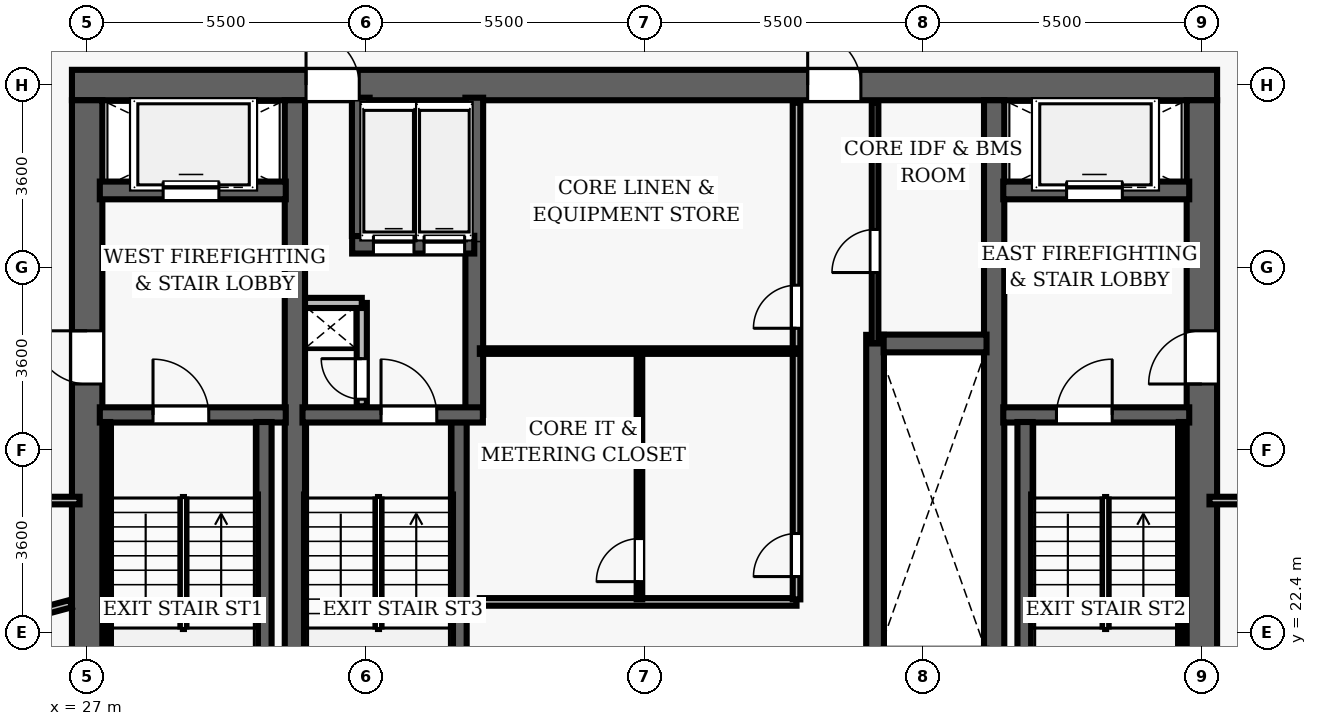
"""IFC4 building model, lengths in metres.
Left out: names, types, materials, properties, quantities, classifications, styles, units other than length and angle.
Written with IfcOpenShell. Run it as: python <this file> out.ifc"""

import sys

from ifc_helpers import new_model, si_unit, direction, frame, frame_2d, origin, place, context, subcontext, project, spatial, rectangle, extrude, element, fill, save


model = new_model("IFC4")
c1 = context("Model", 3, precision=1e-05, world=origin(), true_north=direction((0.0, 1.0)))
c2 = subcontext(c1, "Body", "Model", "MODEL_VIEW")
j1 = project(units=[si_unit("LENGTHUNIT", "METRE"), si_unit("PLANEANGLEUNIT", "RADIAN")], contexts=[c1])
p1 = place(None, origin())
s1 = spatial("IfcSite", under=j1, at=p1, CompositionType="ELEMENT")
p2 = place(p1, origin())
s2 = spatial("IfcBuilding", under=s1, at=p2, CompositionType="ELEMENT")
p3 = place(p2, frame((0.0, 0.0, 127.3)))
s3 = spatial("IfcBuildingStorey", under=s2, at=p3, CompositionType="ELEMENT", Elevation=127.3)
p4 = place(p3, frame((26.7, 33.2, 0.0), z_axis=(0.0, 0.0, 1.0), x_axis=(1.0, 0.0, 0.0)))
e1 = element("IfcWall", 1, at=p4, inside=s3, PredefinedType="SHEAR", context=c2, shape_type="SweptSolid", body=[
    extrude(rectangle(XDim=22.6, YDim=0.6, at=frame_2d((11.3, 0.0))), origin(), (0.0, 0.0, 1.0), 3.5),
])
p5 = place(p4, frame((4.62, 0.0, 0.0)))
e2 = element("IfcOpeningElement", 2, at=p5, cuts=e1, PredefinedType="OPENING", context=c2, shape_type="SweptSolid", body=[
    extrude(rectangle(XDim=1.05, YDim=2.15, at=frame_2d((0.525, 1.075))), frame((0.0, 0.31, 0.0), z_axis=(0.0, -1.0, 0.0), x_axis=(1.0, 0.0, 0.0)), (0.0, 0.0, 1.0), 0.62),
])
p6 = place(p4, frame((14.52, 0.0, 0.0)))
e3 = element("IfcOpeningElement", 3, at=p6, cuts=e1, PredefinedType="OPENING", context=c2, shape_type="SweptSolid", body=[
    extrude(rectangle(XDim=1.05, YDim=2.15, at=frame_2d((0.525, 1.075))), frame((0.0, 0.31, 0.0), z_axis=(0.0, -1.0, 0.0), x_axis=(1.0, 0.0, 0.0)), (0.0, 0.0, 1.0), 0.62),
])
p7 = place(p3, frame((27.0, 19.1, 0.0), z_axis=(0.0, 0.0, 1.0), x_axis=(0.0, 1.0, 0.0)))
e4 = element("IfcWall", 4, at=p7, inside=s3, PredefinedType="SHEAR", context=c2, shape_type="SweptSolid", body=[
    extrude(rectangle(XDim=13.8, YDim=0.6, at=frame_2d((6.9, 0.0))), origin(), (0.0, 0.0, 1.0), 3.5),
])
p8 = place(p7, frame((8.2, 0.0, 0.0)))
e5 = element("IfcOpeningElement", 5, at=p8, cuts=e4, PredefinedType="OPENING", context=c2, shape_type="SweptSolid", body=[
    extrude(rectangle(XDim=1.05, YDim=2.15, at=frame_2d((0.525, 1.075))), frame((0.0, 0.31, 0.0), z_axis=(0.0, -1.0, 0.0), x_axis=(1.0, 0.0, 0.0)), (0.0, 0.0, 1.0), 0.62),
])
p9 = place(p3, frame((49.0, 19.1, 0.0), z_axis=(0.0, 0.0, 1.0), x_axis=(0.0, 1.0, 0.0)))
e6 = element("IfcWall", 6, at=p9, inside=s3, PredefinedType="SHEAR", context=c2, shape_type="SweptSolid", body=[
    extrude(rectangle(XDim=13.8, YDim=0.6, at=frame_2d((6.9, 0.0))), origin(), (0.0, 0.0, 1.0), 3.5),
])
p10 = place(p9, frame((8.2, 0.0, 0.0)))
e7 = element("IfcOpeningElement", 7, at=p10, cuts=e6, PredefinedType="OPENING", context=c2, shape_type="SweptSolid", body=[
    extrude(rectangle(XDim=1.05, YDim=2.15, at=frame_2d((0.525, 1.075))), frame((0.0, 0.31, 0.0), z_axis=(0.0, -1.0, 0.0), x_axis=(1.0, 0.0, 0.0)), (0.0, 0.0, 1.0), 0.62),
])
for number, where, z_axis, x_axis in (
    (8, (31.1, 19.1, 0.0), (0.0, 0.0, 1.0), (0.0, 1.0, 0.0)),
    (9, (44.9, 19.1, 0.0), (0.0, 0.0, 1.0), (0.0, 1.0, 0.0)),
):
    element("IfcWall", number, at=place(p3, frame(where, z_axis=z_axis, x_axis=x_axis)), inside=s3, PredefinedType="SHEAR", context=c2, shape_type="SweptSolid", body=[
        extrude(rectangle(XDim=13.8, YDim=0.4, at=frame_2d((6.9, 0.0))), origin(), (0.0, 0.0, 1.0), 3.5),
    ])
p11 = place(p3, frame((27.25, 26.69, 0.0), z_axis=(0.0, 0.0, 1.0), x_axis=(1.0, 0.0, 0.0)))
e10 = element("IfcWall", 10, at=p11, inside=s3, PredefinedType="SHEAR", context=c2, shape_type="SweptSolid", body=[
    extrude(rectangle(XDim=3.67, YDim=0.3, at=frame_2d((1.835, 0.0))), origin(), (0.0, 0.0, 1.0), 3.5),
])
p12 = place(p11, frame((1.05, 0.0, 0.0)))
e11 = element("IfcOpeningElement", 11, at=p12, cuts=e10, PredefinedType="OPENING", context=c2, shape_type="SweptSolid", body=[
    extrude(rectangle(XDim=1.1, YDim=2.15, at=frame_2d((0.55, 1.075))), frame((0.0, 0.16, 0.0), z_axis=(0.0, -1.0, 0.0), x_axis=(1.0, 0.0, 0.0)), (0.0, 0.0, 1.0), 0.32),
])
p13 = place(p3, frame((30.49, 19.05, 0.0), z_axis=(0.0, 0.0, 1.0), x_axis=(0.0, 1.0, 0.0)))
e12 = element("IfcWall", 12, at=p13, inside=s3, PredefinedType="SHEAR", context=c2, shape_type="SweptSolid", body=[
    extrude(rectangle(XDim=7.5, YDim=0.3, at=frame_2d((3.75, 0.0))), origin(), (0.0, 0.0, 1.0), 3.5),
])
p14 = place(p3, frame((27.395, 19.1, 0.0), z_axis=(0.0, 0.0, 1.0), x_axis=(0.0, 1.0, 0.0)))
e13 = element("IfcWall", 13, at=p14, inside=s3, PredefinedType="SHEAR", context=c2, shape_type="SweptSolid", body=[
    extrude(rectangle(XDim=7.45, YDim=0.12, at=frame_2d((3.725, 0.0))), origin(), (0.0, 0.0, 1.0), 3.5),
])
p15 = place(p3, frame((27.25, 31.12, 0.0), z_axis=(0.0, 0.0, 1.0), x_axis=(1.0, 0.0, 0.0)))
e14 = element("IfcWall", 14, at=p15, inside=s3, PredefinedType="SHEAR", context=c2, shape_type="SweptSolid", body=[
    extrude(rectangle(XDim=3.67, YDim=0.35, at=frame_2d((1.835, 0.0))), origin(), (0.0, 0.0, 1.0), 2.675),
])
p16 = place(p15, frame((1.25, 0.0, 0.0)))
e15 = element("IfcOpeningElement", 15, at=p16, cuts=e14, PredefinedType="OPENING", context=c2, shape_type="SweptSolid", body=[
    extrude(rectangle(XDim=1.1, YDim=2.15, at=frame_2d((0.55, 1.075))), frame((0.0, 0.185, 0.0), z_axis=(0.0, -1.0, 0.0), x_axis=(1.0, 0.0, 0.0)), (0.0, 0.0, 1.0), 0.37),
])
p17 = place(p3, frame((45.08, 26.69, 0.0), z_axis=(0.0, 0.0, 1.0), x_axis=(1.0, 0.0, 0.0)))
e16 = element("IfcWall", 16, at=p17, inside=s3, PredefinedType="SHEAR", context=c2, shape_type="SweptSolid", body=[
    extrude(rectangle(XDim=3.67, YDim=0.3, at=frame_2d((1.835, 0.0))), origin(), (0.0, 0.0, 1.0), 3.5),
])
p18 = place(p17, frame((1.05, 0.0, 0.0)))
e17 = element("IfcOpeningElement", 17, at=p18, cuts=e16, PredefinedType="OPENING", context=c2, shape_type="SweptSolid", body=[
    extrude(rectangle(XDim=1.1, YDim=2.15, at=frame_2d((0.55, 1.075))), frame((0.0, 0.16, 0.0), z_axis=(0.0, -1.0, 0.0), x_axis=(1.0, 0.0, 0.0)), (0.0, 0.0, 1.0), 0.32),
])
p19 = place(p3, frame((45.51, 19.05, 0.0), z_axis=(0.0, 0.0, 1.0), x_axis=(0.0, 1.0, 0.0)))
e18 = element("IfcWall", 18, at=p19, inside=s3, PredefinedType="SHEAR", context=c2, shape_type="SweptSolid", body=[
    extrude(rectangle(XDim=7.5, YDim=0.3, at=frame_2d((3.75, 0.0))), origin(), (0.0, 0.0, 1.0), 3.5),
])
p20 = place(p3, frame((48.605, 19.1, 0.0), z_axis=(0.0, 0.0, 1.0), x_axis=(0.0, 1.0, 0.0)))
e19 = element("IfcWall", 19, at=p20, inside=s3, PredefinedType="SHEAR", context=c2, shape_type="SweptSolid", body=[
    extrude(rectangle(XDim=7.45, YDim=0.12, at=frame_2d((3.725, 0.0))), origin(), (0.0, 0.0, 1.0), 3.5),
])
p21 = place(p3, frame((45.08, 31.12, 0.0), z_axis=(0.0, 0.0, 1.0), x_axis=(1.0, 0.0, 0.0)))
e20 = element("IfcWall", 20, at=p21, inside=s3, PredefinedType="SHEAR", context=c2, shape_type="SweptSolid", body=[
    extrude(rectangle(XDim=3.67, YDim=0.35, at=frame_2d((1.835, 0.0))), origin(), (0.0, 0.0, 1.0), 2.675),
])
p22 = place(p21, frame((1.25, 0.0, 0.0)))
e21 = element("IfcOpeningElement", 21, at=p22, cuts=e20, PredefinedType="OPENING", context=c2, shape_type="SweptSolid", body=[
    extrude(rectangle(XDim=1.1, YDim=2.15, at=frame_2d((0.55, 1.075))), frame((0.0, 0.185, 0.0), z_axis=(0.0, -1.0, 0.0), x_axis=(1.0, 0.0, 0.0)), (0.0, 0.0, 1.0), 0.37),
])
p23 = place(p3, frame((34.34, 19.05, 0.0), z_axis=(0.0, 0.0, 1.0), x_axis=(0.0, 1.0, 0.0)))
e22 = element("IfcWall", 22, at=p23, inside=s3, PredefinedType="SHEAR", context=c2, shape_type="SweptSolid", body=[
    extrude(rectangle(XDim=7.5, YDim=0.3, at=frame_2d((3.75, 0.0))), origin(), (0.0, 0.0, 1.0), 3.5),
])
p24 = place(p3, frame((34.64, 26.69, 0.0), z_axis=(0.0, 0.0, 1.0), x_axis=(0.0, 1.0, 0.0)))
e23 = element("IfcWall", 23, at=p24, inside=s3, PredefinedType="SHEAR", context=c2, shape_type="SweptSolid", body=[
    extrude(rectangle(XDim=6.26, YDim=0.35, at=frame_2d((3.13, 0.0))), origin(), (0.0, 0.0, 1.0), 3.5),
])
p25 = place(p3, frame((31.25, 26.69, 0.0), z_axis=(0.0, 0.0, 1.0), x_axis=(1.0, 0.0, 0.0)))
e24 = element("IfcWall", 24, at=p25, inside=s3, PredefinedType="SHEAR", context=c2, shape_type="SweptSolid", body=[
    extrude(rectangle(XDim=3.56, YDim=0.3, at=frame_2d((1.78, 0.0))), origin(), (0.0, 0.0, 1.0), 3.5),
])
p26 = place(p25, frame((1.55, 0.0, 0.0)))
e25 = element("IfcOpeningElement", 25, at=p26, cuts=e24, PredefinedType="OPENING", context=c2, shape_type="SweptSolid", body=[
    extrude(rectangle(XDim=1.1, YDim=2.15, at=frame_2d((0.55, 1.075))), frame((0.0, 0.16, 0.0), z_axis=(0.0, -1.0, 0.0), x_axis=(1.0, 0.0, 0.0)), (0.0, 0.0, 1.0), 0.32),
])
p27 = place(p3, frame((32.23, 30.05, 0.0), z_axis=(0.0, 0.0, 1.0), x_axis=(1.0, 0.0, 0.0)))
e26 = element("IfcWall", 26, at=p27, inside=s3, PredefinedType="SHEAR", context=c2, shape_type="SweptSolid", body=[
    extrude(rectangle(XDim=2.41, YDim=0.35, at=frame_2d((1.205, 0.0))), origin(), (0.0, 0.0, 1.0), 2.675),
])
p28 = place(p27, frame((0.42, 0.0, 0.0)))
e27 = element("IfcOpeningElement", 27, at=p28, cuts=e26, PredefinedType="OPENING", context=c2, shape_type="SweptSolid", body=[
    extrude(rectangle(XDim=0.8, YDim=2.15, at=frame_2d((0.4, 1.075))), frame((0.0, 0.185, 0.0), z_axis=(0.0, -1.0, 0.0), x_axis=(1.0, 0.0, 0.0)), (0.0, 0.0, 1.0), 0.37),
])
p29 = place(p27, frame((1.42, 0.0, 0.0)))
e28 = element("IfcOpeningElement", 28, at=p29, cuts=e26, PredefinedType="OPENING", context=c2, shape_type="SweptSolid", body=[
    extrude(rectangle(XDim=0.8, YDim=2.15, at=frame_2d((0.4, 1.075))), frame((0.0, 0.185, 0.0), z_axis=(0.0, -1.0, 0.0), x_axis=(1.0, 0.0, 0.0)), (0.0, 0.0, 1.0), 0.37),
])
p30 = place(p3, frame((32.4, 30.22, 0.0), z_axis=(0.0, 0.0, 1.0), x_axis=(0.0, 1.0, 0.0)))
e29 = element("IfcWall", 29, at=p30, inside=s3, PredefinedType="SHEAR", context=c2, shape_type="SweptSolid", body=[
    extrude(rectangle(XDim=2.73, YDim=0.35, at=frame_2d((1.365, 0.0))), origin(), (0.0, 0.0, 1.0), 2.675),
])
p31 = place(p3, frame((32.42, 26.86, 0.0), z_axis=(0.0, 0.0, 1.0), x_axis=(0.0, 1.0, 0.0)))
e30 = element("IfcWall", 30, at=p31, inside=s3, PredefinedType="PARTITIONING", context=c2, shape_type="SweptSolid", body=[
    extrude(rectangle(XDim=2.04, YDim=0.2, at=frame_2d((1.02, 0.0))), origin(), (0.0, 0.0, 1.0), 2.675),
])
p32 = place(p31, frame((0.14, 0.0, 0.0)))
e31 = element("IfcOpeningElement", 31, at=p32, cuts=e30, PredefinedType="OPENING", context=c2, shape_type="SweptSolid", body=[
    extrude(rectangle(XDim=0.8, YDim=2.05, at=frame_2d((0.4, 1.025))), frame((0.0, 0.11, 0.0), z_axis=(0.0, -1.0, 0.0), x_axis=(1.0, 0.0, 0.0)), (0.0, 0.0, 1.0), 0.22),
])
p33 = place(p3, frame((31.3, 28.9, 0.0), z_axis=(0.0, 0.0, 1.0), x_axis=(1.0, 0.0, 0.0)))
e32 = element("IfcWall", 32, at=p33, inside=s3, PredefinedType="PARTITIONING", context=c2, shape_type="SweptSolid", body=[
    extrude(rectangle(XDim=1.12, YDim=0.2, at=frame_2d((0.56, 0.0))), origin(), (0.0, 0.0, 1.0), 2.675),
])
p34 = place(p3, frame((42.55, 21.73, 0.0), z_axis=(0.0, 0.0, 1.0), x_axis=(0.0, 1.0, 0.0)))
e33 = element("IfcWall", 33, at=p34, inside=s3, PredefinedType="SHEAR", context=c2, shape_type="SweptSolid", body=[
    extrude(rectangle(XDim=6.54, YDim=0.35, at=frame_2d((3.27, 0.0))), origin(), (0.0, 0.0, 1.0), 2.675),
])
p35 = place(p3, frame((42.72, 28.1, 0.0), z_axis=(0.0, 0.0, 1.0), x_axis=(1.0, 0.0, 0.0)))
e34 = element("IfcWall", 34, at=p35, inside=s3, PredefinedType="SHEAR", context=c2, shape_type="SweptSolid", body=[
    extrude(rectangle(XDim=2.03, YDim=0.35, at=frame_2d((1.015, 0.0))), origin(), (0.0, 0.0, 1.0), 2.675),
])
p36 = place(p3, frame((34.75, 23.0, 0.0), z_axis=(0.0, 0.0, 1.0), x_axis=(1.0, 0.0, 0.0)))
e35 = element("IfcWall", 35, at=p36, inside=s3, PredefinedType="PARTITIONING", context=c2, shape_type="SweptSolid", body=[
    extrude(rectangle(XDim=6.25, YDim=0.15, at=frame_2d((3.125, 0.0))), origin(), (0.0, 0.0, 1.0), 2.675),
])
p37 = place(p3, frame((41.0, 23.05, 0.0), z_axis=(0.0, 0.0, 1.0), x_axis=(0.0, 1.0, 0.0)))
e36 = element("IfcWall", 36, at=p37, inside=s3, PredefinedType="PARTITIONING", context=c2, shape_type="SweptSolid", body=[
    extrude(rectangle(XDim=9.8, YDim=0.15, at=frame_2d((4.9, 0.0))), origin(), (0.0, 0.0, 1.0), 2.675),
])
p38 = place(p37, frame((5.35, 0.0, 0.0)))
e37 = element("IfcOpeningElement", 37, at=p38, cuts=e36, PredefinedType="OPENING", context=c2, shape_type="SweptSolid", body=[
    extrude(rectangle(XDim=0.85, YDim=2.1, at=frame_2d((0.425, 1.05))), frame((0.0, 0.085, 0.0), z_axis=(0.0, -1.0, 0.0), x_axis=(1.0, 0.0, 0.0)), (0.0, 0.0, 1.0), 0.17),
])
p39 = place(p37, frame((0.45, 0.0, 0.0)))
e38 = element("IfcOpeningElement", 38, at=p39, cuts=e36, PredefinedType="OPENING", context=c2, shape_type="SweptSolid", body=[
    extrude(rectangle(XDim=0.85, YDim=2.1, at=frame_2d((0.425, 1.05))), frame((0.0, 0.085, 0.0), z_axis=(0.0, -1.0, 0.0), x_axis=(1.0, 0.0, 0.0)), (0.0, 0.0, 1.0), 0.17),
])
p40 = place(p3, frame((34.75, 27.95, 0.0), z_axis=(0.0, 0.0, 1.0), x_axis=(1.0, 0.0, 0.0)))
e39 = element("IfcWall", 39, at=p40, inside=s3, PredefinedType="PARTITIONING", context=c2, shape_type="SweptSolid", body=[
    extrude(rectangle(XDim=6.25, YDim=0.11, at=frame_2d((3.125, 0.0))), origin(), (0.0, 0.0, 1.0), 2.675),
])
p41 = place(p3, frame((37.9, 23.05, 0.0), z_axis=(0.0, 0.0, 1.0), x_axis=(0.0, 1.0, 0.0)))
e40 = element("IfcWall", 40, at=p41, inside=s3, PredefinedType="PARTITIONING", context=c2, shape_type="SweptSolid", body=[
    extrude(rectangle(XDim=4.9, YDim=0.11, at=frame_2d((2.45, 0.0))), origin(), (0.0, 0.0, 1.0), 2.675),
])
p42 = place(p41, frame((0.35, 0.0, 0.0)))
e41 = element("IfcOpeningElement", 41, at=p42, cuts=e40, PredefinedType="OPENING", context=c2, shape_type="SweptSolid", body=[
    extrude(rectangle(XDim=0.85, YDim=2.1, at=frame_2d((0.425, 1.05))), frame((0.0, 0.065, 0.0), z_axis=(0.0, -1.0, 0.0), x_axis=(1.0, 0.0, 0.0)), (0.0, 0.0, 1.0), 0.13),
])
p43 = place(p3, frame((42.55, 28.1, 0.0), z_axis=(0.0, 0.0, 1.0), x_axis=(0.0, 1.0, 0.0)))
e42 = element("IfcWall", 42, at=p43, inside=s3, PredefinedType="PARTITIONING", context=c2, shape_type="SweptSolid", body=[
    extrude(rectangle(XDim=4.75, YDim=0.13, at=frame_2d((2.375, 0.0))), origin(), (0.0, 0.0, 1.0), 2.675),
])
p44 = place(p43, frame((1.4, 0.0, 0.0)))
e43 = element("IfcOpeningElement", 43, at=p44, cuts=e42, PredefinedType="OPENING", context=c2, shape_type="SweptSolid", body=[
    extrude(rectangle(XDim=0.85, YDim=2.1, at=frame_2d((0.425, 1.05))), frame((0.0, 0.075, 0.0), z_axis=(0.0, -1.0, 0.0), x_axis=(1.0, 0.0, 0.0)), (0.0, 0.0, 1.0), 0.15),
])
p45 = place(p3, frame((14.5, 25.0, 0.0), z_axis=(0.0, 0.0, 1.0), x_axis=(1.0, 0.0, 0.0)))
e44 = element("IfcWall", 44, at=p45, inside=s3, PredefinedType="PARTITIONING", context=c2, shape_type="SweptSolid", body=[
    extrude(rectangle(XDim=12.35, YDim=0.15, at=frame_2d((6.175, 0.0))), origin(), (0.0, 0.0, 1.0), 2.675),
])
p46 = place(p3, frame((49.15, 25.0, 0.0), z_axis=(0.0, 0.0, 1.0), x_axis=(1.0, 0.0, 0.0)))
e45 = element("IfcWall", 45, at=p46, inside=s3, PredefinedType="PARTITIONING", context=c2, shape_type="SweptSolid", body=[
    extrude(rectangle(XDim=12.35, YDim=0.15, at=frame_2d((6.175, 0.0))), origin(), (0.0, 0.0, 1.0), 2.675),
])
p47 = place(p46, frame((2.613, 0.0, 0.0)))
e46 = element("IfcOpeningElement", 46, at=p47, cuts=e45, PredefinedType="OPENING", context=c2, shape_type="SweptSolid", body=[
    extrude(rectangle(XDim=0.95, YDim=2.15, at=frame_2d((0.475, 1.075))), frame((0.0, 0.085, 0.0), z_axis=(0.0, -1.0, 0.0), x_axis=(1.0, 0.0, 0.0)), (0.0, 0.0, 1.0), 0.17),
])
p48 = place(p3, frame((26.68, 22.967, 0.0), z_axis=(0.0, 0.0, 1.0), x_axis=(-0.965923864026, -0.258826368257, 0.0)))
e47 = element("IfcWall", 47, at=p48, inside=s3, PredefinedType="PARTITIONING", context=c2, shape_type="SweptSolid", body=[
    extrude(rectangle(XDim=12.886, YDim=0.15, at=frame_2d((6.443, 0.0))), origin(), (0.0, 0.0, 1.0), 2.675),
])
p49 = place(p12, origin())
e48 = element("IfcDoor", 48, at=p49, inside=s3, OperationType="SINGLE_SWING_LEFT", PredefinedType="DOOR", context=c2, shape_type="SweptSolid", body=[
    extrude(rectangle(XDim=1.1, YDim=2.15, at=frame_2d((0.55, 1.075))), frame((0.0, 0.025, 0.0), z_axis=(0.0, -1.0, 0.0), x_axis=(1.0, 0.0, 0.0)), (0.0, 0.0, 1.0), 0.05),
])
fill(e11, e48)
p50 = place(p8, origin())
e49 = element("IfcDoor", 49, at=p50, inside=s3, OperationType="SINGLE_SWING_RIGHT", PredefinedType="DOOR", context=c2, shape_type="SweptSolid", body=[
    extrude(rectangle(XDim=1.05, YDim=2.15, at=frame_2d((0.525, 1.075))), frame((0.0, 0.025, 0.0), z_axis=(0.0, -1.0, 0.0), x_axis=(1.0, 0.0, 0.0)), (0.0, 0.0, 1.0), 0.05),
])
fill(e5, e49)
p51 = place(p18, origin())
e50 = element("IfcDoor", 50, at=p51, inside=s3, OperationType="SINGLE_SWING_RIGHT", PredefinedType="DOOR", context=c2, shape_type="SweptSolid", body=[
    extrude(rectangle(XDim=1.1, YDim=2.15, at=frame_2d((0.55, 1.075))), frame((0.0, 0.025, 0.0), z_axis=(0.0, -1.0, 0.0), x_axis=(1.0, 0.0, 0.0)), (0.0, 0.0, 1.0), 0.05),
])
fill(e17, e50)
p52 = place(p10, origin())
e51 = element("IfcDoor", 51, at=p52, inside=s3, OperationType="SINGLE_SWING_LEFT", PredefinedType="DOOR", context=c2, shape_type="SweptSolid", body=[
    extrude(rectangle(XDim=1.05, YDim=2.15, at=frame_2d((0.525, 1.075))), frame((0.0, 0.025, 0.0), z_axis=(0.0, -1.0, 0.0), x_axis=(1.0, 0.0, 0.0)), (0.0, 0.0, 1.0), 0.05),
])
fill(e7, e51)
p53 = place(p26, origin())
e52 = element("IfcDoor", 52, at=p53, inside=s3, OperationType="SINGLE_SWING_LEFT", PredefinedType="DOOR", context=c2, shape_type="SweptSolid", body=[
    extrude(rectangle(XDim=1.1, YDim=2.15, at=frame_2d((0.55, 1.075))), frame((0.0, 0.025, 0.0), z_axis=(0.0, -1.0, 0.0), x_axis=(1.0, 0.0, 0.0)), (0.0, 0.0, 1.0), 0.05),
])
fill(e25, e52)
p54 = place(p32, origin())
e53 = element("IfcDoor", 53, at=p54, inside=s3, OperationType="SINGLE_SWING_RIGHT", PredefinedType="DOOR", context=c2, shape_type="SweptSolid", body=[
    extrude(rectangle(XDim=0.8, YDim=2.05, at=frame_2d((0.4, 1.025))), frame((0.0, 0.025, 0.0), z_axis=(0.0, -1.0, 0.0), x_axis=(1.0, 0.0, 0.0)), (0.0, 0.0, 1.0), 0.05),
])
fill(e31, e53)
p55 = place(p5, origin())
e54 = element("IfcDoor", 54, at=p55, inside=s3, OperationType="SINGLE_SWING_LEFT", PredefinedType="DOOR", context=c2, shape_type="SweptSolid", body=[
    extrude(rectangle(XDim=1.05, YDim=2.15, at=frame_2d((0.525, 1.075))), frame((0.0, 0.025, 0.0), z_axis=(0.0, -1.0, 0.0), x_axis=(1.0, 0.0, 0.0)), (0.0, 0.0, 1.0), 0.05),
])
fill(e2, e54)
p56 = place(p6, origin())
e55 = element("IfcDoor", 55, at=p56, inside=s3, OperationType="SINGLE_SWING_LEFT", PredefinedType="DOOR", context=c2, shape_type="SweptSolid", body=[
    extrude(rectangle(XDim=1.05, YDim=2.15, at=frame_2d((0.525, 1.075))), frame((0.0, 0.025, 0.0), z_axis=(0.0, -1.0, 0.0), x_axis=(1.0, 0.0, 0.0)), (0.0, 0.0, 1.0), 0.05),
])
fill(e3, e55)
p57 = place(p38, origin())
e56 = element("IfcDoor", 56, at=p57, inside=s3, OperationType="SINGLE_SWING_LEFT", PredefinedType="DOOR", context=c2, shape_type="SweptSolid", body=[
    extrude(rectangle(XDim=0.85, YDim=2.1, at=frame_2d((0.425, 1.05))), frame((0.0, 0.025, 0.0), z_axis=(0.0, -1.0, 0.0), x_axis=(1.0, 0.0, 0.0)), (0.0, 0.0, 1.0), 0.05),
])
fill(e37, e56)
p58 = place(p39, origin())
e57 = element("IfcDoor", 57, at=p58, inside=s3, OperationType="SINGLE_SWING_LEFT", PredefinedType="DOOR", context=c2, shape_type="SweptSolid", body=[
    extrude(rectangle(XDim=0.85, YDim=2.1, at=frame_2d((0.425, 1.05))), frame((0.0, 0.025, 0.0), z_axis=(0.0, -1.0, 0.0), x_axis=(1.0, 0.0, 0.0)), (0.0, 0.0, 1.0), 0.05),
])
fill(e38, e57)
p59 = place(p42, origin())
e58 = element("IfcDoor", 58, at=p59, inside=s3, OperationType="SINGLE_SWING_LEFT", PredefinedType="DOOR", context=c2, shape_type="SweptSolid", body=[
    extrude(rectangle(XDim=0.85, YDim=2.1, at=frame_2d((0.425, 1.05))), frame((0.0, 0.025, 0.0), z_axis=(0.0, -1.0, 0.0), x_axis=(1.0, 0.0, 0.0)), (0.0, 0.0, 1.0), 0.05),
])
fill(e41, e58)
p60 = place(p44, origin())
e59 = element("IfcDoor", 59, at=p60, inside=s3, OperationType="SINGLE_SWING_LEFT", PredefinedType="DOOR", context=c2, shape_type="SweptSolid", body=[
    extrude(rectangle(XDim=0.85, YDim=2.1, at=frame_2d((0.425, 1.05))), frame((0.0, 0.025, 0.0), z_axis=(0.0, -1.0, 0.0), x_axis=(1.0, 0.0, 0.0)), (0.0, 0.0, 1.0), 0.05),
])
fill(e43, e59)
p61 = place(p16, origin())
e60 = element("IfcDoor", 60, at=p61, inside=s3, OperationType="SLIDING_TO_LEFT", PredefinedType="DOOR", context=c2, shape_type="SweptSolid", body=[
    extrude(rectangle(XDim=1.1, YDim=2.15, at=frame_2d((0.55, 1.075))), frame((0.0, 0.025, 0.0), z_axis=(0.0, -1.0, 0.0), x_axis=(1.0, 0.0, 0.0)), (0.0, 0.0, 1.0), 0.05),
])
fill(e15, e60)
p62 = place(p22, origin())
e61 = element("IfcDoor", 61, at=p62, inside=s3, OperationType="SLIDING_TO_LEFT", PredefinedType="DOOR", context=c2, shape_type="SweptSolid", body=[
    extrude(rectangle(XDim=1.1, YDim=2.15, at=frame_2d((0.55, 1.075))), frame((0.0, 0.025, 0.0), z_axis=(0.0, -1.0, 0.0), x_axis=(1.0, 0.0, 0.0)), (0.0, 0.0, 1.0), 0.05),
])
fill(e21, e61)
p63 = place(p28, origin())
e62 = element("IfcDoor", 62, at=p63, inside=s3, OperationType="SLIDING_TO_LEFT", PredefinedType="DOOR", context=c2, shape_type="SweptSolid", body=[
    extrude(rectangle(XDim=0.8, YDim=2.15, at=frame_2d((0.4, 1.075))), frame((0.0, 0.025, 0.0), z_axis=(0.0, -1.0, 0.0), x_axis=(1.0, 0.0, 0.0)), (0.0, 0.0, 1.0), 0.05),
])
fill(e27, e62)
p64 = place(p29, origin())
e63 = element("IfcDoor", 63, at=p64, inside=s3, OperationType="SLIDING_TO_LEFT", PredefinedType="DOOR", context=c2, shape_type="SweptSolid", body=[
    extrude(rectangle(XDim=0.8, YDim=2.15, at=frame_2d((0.4, 1.075))), frame((0.0, 0.025, 0.0), z_axis=(0.0, -1.0, 0.0), x_axis=(1.0, 0.0, 0.0)), (0.0, 0.0, 1.0), 0.05),
])
fill(e28, e63)
save(model, sys.argv[1])
